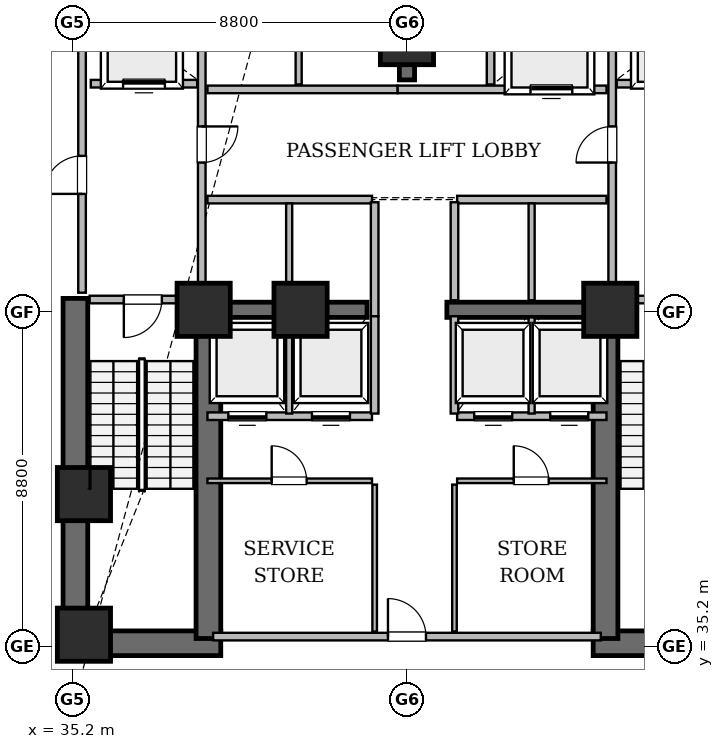
"""IFC4 building model, lengths in metres.
Left out: names, types, materials, properties, quantities, classifications, styles, units other than length and angle.
Written with IfcOpenShell. Run it as: python <this file> out.ifc"""

import sys

from ifc_helpers import new_model, si_unit, direction, frame, frame_2d, origin, origin_2d, place, context, subcontext, project, spatial, rectangle, extrude, element, fill, save


model = new_model("IFC4")
c1 = context("Model", 3, precision=1e-05, world=origin(), true_north=direction((0.0, 1.0)))
c2 = subcontext(c1, "Body", "Model", "MODEL_VIEW")
j1 = project(units=[si_unit("LENGTHUNIT", "METRE"), si_unit("PLANEANGLEUNIT", "RADIAN")], contexts=[c1])
p1 = place(None, origin())
s1 = spatial("IfcSite", under=j1, at=p1, CompositionType="ELEMENT")
p2 = place(p1, origin())
s2 = spatial("IfcBuilding", under=s1, at=p2, CompositionType="ELEMENT")
p3 = place(p2, frame((0.0, 0.0, 19.2)))
s3 = spatial("IfcBuildingStorey", under=s2, at=p3, CompositionType="ELEMENT", Elevation=19.2)
for number, where, z_axis, x_axis in (
    (1, (34.95, 35.275, 0.0), (0.0, 0.0, 1.0), (1.0, 0.0, 0.0)),
    (2, (48.9, 35.275, 0.0), (0.0, 0.0, 1.0), (1.0, 0.0, 0.0)),
):
    element("IfcWall", number, at=place(p3, frame(where, z_axis=z_axis, x_axis=x_axis)), inside=s3, PredefinedType="SHEAR", context=c2, shape_type="SweptSolid", body=[
        extrude(rectangle(XDim=4.15, YDim=0.65, at=frame_2d((2.075, 0.0))), origin(), (0.0, 0.0, 1.0), 4.35),
    ])
p4 = place(p3, frame((35.275, 34.95, 0.0), z_axis=(0.0, 0.0, 1.0), x_axis=(0.0, 1.0, 0.0)))
e3 = element("IfcWall", 3, at=p4, inside=s3, PredefinedType="SHEAR", context=c2, shape_type="SweptSolid", body=[
    extrude(rectangle(XDim=9.4, YDim=0.65, at=frame_2d((4.7, 0.0))), origin(), (0.0, 0.0, 1.0), 4.35),
])
for number, where, z_axis, x_axis in (
    (4, (38.775, 35.4, 0.0), (0.0, 0.0, 1.0), (0.0, 1.0, 0.0)),
    (5, (49.225, 35.4, 0.0), (0.0, 0.0, 1.0), (0.0, 1.0, 0.0)),
):
    element("IfcWall", number, at=place(p3, frame(where, z_axis=z_axis, x_axis=x_axis)), inside=s3, PredefinedType="SHEAR", context=c2, shape_type="SweptSolid", body=[
        extrude(rectangle(XDim=8.95, YDim=0.65, at=frame_2d((4.475, 0.0))), origin(), (0.0, 0.0, 1.0), 4.35),
    ])
p5 = place(p3, frame((44.0, 50.1, 0.0), z_axis=(0.0, 0.0, 1.0), x_axis=(0.0, 1.0, 0.0)))
e6 = element("IfcWall", 6, at=p5, inside=s3, PredefinedType="SHEAR", context=c2, shape_type="SweptSolid", body=[
    extrude(rectangle(XDim=2.1, YDim=0.4, at=frame_2d((1.05, 0.0))), origin(), (0.0, 0.0, 1.0), 4.35),
])
for number, where, z_axis, x_axis in (
    (7, (38.75, 44.05, 0.0), (0.0, 0.0, 1.0), (1.0, 0.0, 0.0)),
    (8, (45.05, 44.05, 0.0), (0.0, 0.0, 1.0), (1.0, 0.0, 0.0)),
):
    element("IfcWall", number, at=place(p3, frame(where, z_axis=z_axis, x_axis=x_axis)), inside=s3, PredefinedType="SHEAR", context=c2, shape_type="SweptSolid", body=[
        extrude(rectangle(XDim=4.2, YDim=0.4, at=frame_2d((2.1, 0.0))), origin(), (0.0, 0.0, 1.0), 4.35),
    ])
for number, where, z_axis, x_axis in (
    (9, (35.5, 35.5, 0.0), (0.0, 0.0, 1.0), (1.0, 0.0, 0.0)),
    (10, (38.65, 44.05, 0.0), (0.0, 0.0, 1.0), (1.0, 0.0, 0.0)),
    (11, (49.35, 44.05, 0.0), (0.0, 0.0, 1.0), (1.0, 0.0, 0.0)),
    (12, (44.0, 51.2, 0.0), (0.0, 0.0, 1.0), (1.0, 0.0, 0.0)),
    (13, (35.5, 39.2, 0.0), (0.0, 0.0, 1.0), (1.0, 0.0, 0.0)),
    (14, (41.2, 44.05, 0.0), (0.0, 0.0, 1.0), (1.0, 0.0, 0.0)),
):
    element("IfcColumn", number, at=place(p3, frame(where, z_axis=z_axis, x_axis=x_axis)), inside=s3, PredefinedType="COLUMN", context=c2, shape_type="SweptSolid", body=[
        extrude(rectangle(XDim=1.4, YDim=1.4, at=origin_2d()), origin(), (0.0, 0.0, 1.0), 4.8),
    ])
p6 = place(p3, frame((38.9, 35.45, 0.0), z_axis=(0.0, 0.0, 1.0), x_axis=(1.0, 0.0, 0.0)))
e15 = element("IfcWall", 15, at=p6, inside=s3, PredefinedType="SOLIDWALL", context=c2, shape_type="SweptSolid", body=[
    extrude(rectangle(XDim=10.2, YDim=0.2, at=frame_2d((5.1, 0.0))), origin(), (0.0, 0.0, 1.0), 4.35),
])
p7 = place(p6, frame((4.6, 0.0, 0.0)))
e16 = element("IfcOpeningElement", 16, at=p7, cuts=e15, PredefinedType="OPENING", context=c2, shape_type="SweptSolid", body=[
    extrude(rectangle(XDim=1.0, YDim=2.15, at=frame_2d((0.5, 1.075))), frame((0.0, 0.11, 0.0), z_axis=(0.0, -1.0, 0.0), x_axis=(1.0, 0.0, 0.0)), (0.0, 0.0, 1.0), 0.22),
])
p8 = place(p3, frame((35.45, 44.5, 0.0), z_axis=(0.0, 0.0, 1.0), x_axis=(0.0, 1.0, 0.0)))
e17 = element("IfcWall", 17, at=p8, inside=s3, PredefinedType="SOLIDWALL", context=c2, shape_type="SweptSolid", body=[
    extrude(rectangle(XDim=7.92, YDim=0.2, at=frame_2d((3.96, 0.0))), origin(), (0.0, 0.0, 1.0), 4.35),
])
p9 = place(p8, frame((2.6, 0.0, 0.0)))
e18 = element("IfcOpeningElement", 18, at=p9, cuts=e17, PredefinedType="OPENING", context=c2, shape_type="SweptSolid", body=[
    extrude(rectangle(XDim=1.0, YDim=2.15, at=frame_2d((0.5, 1.075))), frame((0.0, 0.11, 0.0), z_axis=(0.0, -1.0, 0.0), x_axis=(1.0, 0.0, 0.0)), (0.0, 0.0, 1.0), 0.22),
])
p10 = place(p3, frame((38.6, 44.5, 0.0), z_axis=(0.0, 0.0, 1.0), x_axis=(0.0, 1.0, 0.0)))
e19 = element("IfcWall", 19, at=p10, inside=s3, PredefinedType="SOLIDWALL", context=c2, shape_type="SweptSolid", body=[
    extrude(rectangle(XDim=7.92, YDim=0.2, at=frame_2d((3.96, 0.0))), origin(), (0.0, 0.0, 1.0), 4.35),
])
p11 = place(p10, frame((3.425, 0.0, 0.0)))
e20 = element("IfcOpeningElement", 20, at=p11, cuts=e19, PredefinedType="OPENING", context=c2, shape_type="SweptSolid", body=[
    extrude(rectangle(XDim=0.95, YDim=2.15, at=frame_2d((0.475, 1.075))), frame((0.0, 0.11, 0.0), z_axis=(0.0, -1.0, 0.0), x_axis=(1.0, 0.0, 0.0)), (0.0, 0.0, 1.0), 0.22),
])
p12 = place(p3, frame((49.4, 44.5, 0.0), z_axis=(0.0, 0.0, 1.0), x_axis=(0.0, 1.0, 0.0)))
e21 = element("IfcWall", 21, at=p12, inside=s3, PredefinedType="SOLIDWALL", context=c2, shape_type="SweptSolid", body=[
    extrude(rectangle(XDim=7.92, YDim=0.2, at=frame_2d((3.96, 0.0))), origin(), (0.0, 0.0, 1.0), 3.438),
])
p13 = place(p12, frame((3.425, 0.0, 0.0)))
e22 = element("IfcOpeningElement", 22, at=p13, cuts=e21, PredefinedType="OPENING", context=c2, shape_type="SweptSolid", body=[
    extrude(rectangle(XDim=0.95, YDim=2.15, at=frame_2d((0.475, 1.075))), frame((0.0, 0.11, 0.0), z_axis=(0.0, -1.0, 0.0), x_axis=(1.0, 0.0, 0.0)), (0.0, 0.0, 1.0), 0.22),
])
p14 = place(p3, frame((43.75, 49.85, 0.0), z_axis=(0.0, 0.0, 1.0), x_axis=(1.0, 0.0, 0.0)))
e23 = element("IfcWall", 23, at=p14, inside=s3, PredefinedType="SOLIDWALL", context=c2, shape_type="SweptSolid", body=[
    extrude(rectangle(XDim=5.5, YDim=0.2, at=frame_2d((2.75, 0.0))), origin(), (0.0, 0.0, 1.0), 3.438),
])
p15 = place(p14, frame((3.5, 0.0, 0.0)))
e24 = element("IfcOpeningElement", 24, at=p15, cuts=e23, PredefinedType="OPENING", context=c2, shape_type="SweptSolid", body=[
    extrude(rectangle(XDim=1.1, YDim=2.15, at=frame_2d((0.55, 1.075))), frame((0.0, 0.11, 0.0), z_axis=(0.0, -1.0, 0.0), x_axis=(1.0, 0.0, 0.0)), (0.0, 0.0, 1.0), 0.22),
])
p16 = place(p3, frame((38.75, 41.25, 0.0), z_axis=(0.0, 0.0, 1.0), x_axis=(1.0, 0.0, 0.0)))
e25 = element("IfcWall", 25, at=p16, inside=s3, PredefinedType="SOLIDWALL", context=c2, shape_type="SweptSolid", body=[
    extrude(rectangle(XDim=4.33, YDim=0.2, at=frame_2d((2.165, 0.0))), origin(), (0.0, 0.0, 1.0), 4.35),
])
p17 = place(p16, frame((0.55, 0.0, 0.0)))
e26 = element("IfcOpeningElement", 26, at=p17, cuts=e25, PredefinedType="OPENING", context=c2, shape_type="SweptSolid", body=[
    extrude(rectangle(XDim=1.0, YDim=2.15, at=frame_2d((0.5, 1.075))), frame((0.0, 0.11, 0.0), z_axis=(0.0, -1.0, 0.0), x_axis=(1.0, 0.0, 0.0)), (0.0, 0.0, 1.0), 0.22),
])
p18 = place(p16, frame((2.75, 0.0, 0.0)))
e27 = element("IfcOpeningElement", 27, at=p18, cuts=e25, PredefinedType="OPENING", context=c2, shape_type="SweptSolid", body=[
    extrude(rectangle(XDim=1.0, YDim=2.15, at=frame_2d((0.5, 1.075))), frame((0.0, 0.11, 0.0), z_axis=(0.0, -1.0, 0.0), x_axis=(1.0, 0.0, 0.0)), (0.0, 0.0, 1.0), 0.22),
])
p19 = place(p3, frame((38.75, 39.55, 0.0), z_axis=(0.0, 0.0, 1.0), x_axis=(1.0, 0.0, 0.0)))
e28 = element("IfcWall", 28, at=p19, inside=s3, PredefinedType="PARTITIONING", context=c2, shape_type="SweptSolid", body=[
    extrude(rectangle(XDim=4.33, YDim=0.12, at=frame_2d((2.165, 0.0))), origin(), (0.0, 0.0, 1.0), 4.35),
])
p20 = place(p19, frame((1.69, 0.0, 0.0)))
e29 = element("IfcOpeningElement", 29, at=p20, cuts=e28, PredefinedType="OPENING", context=c2, shape_type="SweptSolid", body=[
    extrude(rectangle(XDim=0.92, YDim=2.1, at=frame_2d((0.46, 1.05))), frame((0.0, 0.07, 0.0), z_axis=(0.0, -1.0, 0.0), x_axis=(1.0, 0.0, 0.0)), (0.0, 0.0, 1.0), 0.14),
])
p21 = place(p3, frame((45.32, 41.25, 0.0), z_axis=(0.0, 0.0, 1.0), x_axis=(1.0, 0.0, 0.0)))
e30 = element("IfcWall", 30, at=p21, inside=s3, PredefinedType="SOLIDWALL", context=c2, shape_type="SweptSolid", body=[
    extrude(rectangle(XDim=3.93, YDim=0.2, at=frame_2d((1.965, 0.0))), origin(), (0.0, 0.0, 1.0), 4.35),
])
p22 = place(p21, frame((0.45, 0.0, 0.0)))
e31 = element("IfcOpeningElement", 31, at=p22, cuts=e30, PredefinedType="OPENING", context=c2, shape_type="SweptSolid", body=[
    extrude(rectangle(XDim=1.0, YDim=2.15, at=frame_2d((0.5, 1.075))), frame((0.0, 0.11, 0.0), z_axis=(0.0, -1.0, 0.0), x_axis=(1.0, 0.0, 0.0)), (0.0, 0.0, 1.0), 0.22),
])
p23 = place(p21, frame((2.45, 0.0, 0.0)))
e32 = element("IfcOpeningElement", 32, at=p23, cuts=e30, PredefinedType="OPENING", context=c2, shape_type="SweptSolid", body=[
    extrude(rectangle(XDim=1.0, YDim=2.15, at=frame_2d((0.5, 1.075))), frame((0.0, 0.11, 0.0), z_axis=(0.0, -1.0, 0.0), x_axis=(1.0, 0.0, 0.0)), (0.0, 0.0, 1.0), 0.22),
])
p24 = place(p3, frame((45.32, 39.55, 0.0), z_axis=(0.0, 0.0, 1.0), x_axis=(1.0, 0.0, 0.0)))
e33 = element("IfcWall", 33, at=p24, inside=s3, PredefinedType="PARTITIONING", context=c2, shape_type="SweptSolid", body=[
    extrude(rectangle(XDim=3.93, YDim=0.12, at=frame_2d((1.965, 0.0))), origin(), (0.0, 0.0, 1.0), 4.35),
])
p25 = place(p24, frame((1.49, 0.0, 0.0)))
e34 = element("IfcOpeningElement", 34, at=p25, cuts=e33, PredefinedType="OPENING", context=c2, shape_type="SweptSolid", body=[
    extrude(rectangle(XDim=0.92, YDim=2.1, at=frame_2d((0.46, 1.05))), frame((0.0, 0.07, 0.0), z_axis=(0.0, -1.0, 0.0), x_axis=(1.0, 0.0, 0.0)), (0.0, 0.0, 1.0), 0.14),
])
p26 = place(p3, frame((35.65, 44.32, 0.0), z_axis=(0.0, 0.0, 1.0), x_axis=(1.0, 0.0, 0.0)))
e35 = element("IfcWall", 35, at=p26, inside=s3, PredefinedType="SOLIDWALL", context=c2, shape_type="SweptSolid", body=[
    extrude(rectangle(XDim=2.8, YDim=0.2, at=frame_2d((1.4, 0.0))), origin(), (0.0, 0.0, 1.0), 4.35),
])
p27 = place(p26, frame((0.9, 0.0, 0.0)))
e36 = element("IfcOpeningElement", 36, at=p27, cuts=e35, PredefinedType="OPENING", context=c2, shape_type="SweptSolid", body=[
    extrude(rectangle(XDim=1.0, YDim=2.15, at=frame_2d((0.5, 1.075))), frame((0.0, 0.11, 0.0), z_axis=(0.0, -1.0, 0.0), x_axis=(1.0, 0.0, 0.0)), (0.0, 0.0, 1.0), 0.22),
])
p28 = place(p3, frame((49.55, 44.32, 0.0), z_axis=(0.0, 0.0, 1.0), x_axis=(1.0, 0.0, 0.0)))
e37 = element("IfcWall", 37, at=p28, inside=s3, PredefinedType="SOLIDWALL", context=c2, shape_type="SweptSolid", body=[
    extrude(rectangle(XDim=2.8, YDim=0.2, at=frame_2d((1.4, 0.0))), origin(), (0.0, 0.0, 1.0), 3.438),
])
p29 = place(p28, frame((0.9, 0.0, 0.0)))
e38 = element("IfcOpeningElement", 38, at=p29, cuts=e37, PredefinedType="OPENING", context=c2, shape_type="SweptSolid", body=[
    extrude(rectangle(XDim=1.0, YDim=2.15, at=frame_2d((0.5, 1.075))), frame((0.0, 0.11, 0.0), z_axis=(0.0, -1.0, 0.0), x_axis=(1.0, 0.0, 0.0)), (0.0, 0.0, 1.0), 0.22),
])
p30 = place(p3, frame((35.68, 50.0, 0.0), z_axis=(0.0, 0.0, 1.0), x_axis=(1.0, 0.0, 0.0)))
e39 = element("IfcWall", 39, at=p30, inside=s3, PredefinedType="SOLIDWALL", context=c2, shape_type="SweptSolid", body=[
    extrude(rectangle(XDim=2.8, YDim=0.2, at=frame_2d((1.4, 0.0))), origin(), (0.0, 0.0, 1.0), 4.35),
])
p31 = place(p30, frame((0.85, 0.0, 0.0)))
e40 = element("IfcOpeningElement", 40, at=p31, cuts=e39, PredefinedType="OPENING", context=c2, shape_type="SweptSolid", body=[
    extrude(rectangle(XDim=1.1, YDim=2.15, at=frame_2d((0.55, 1.075))), frame((0.0, 0.11, 0.0), z_axis=(0.0, -1.0, 0.0), x_axis=(1.0, 0.0, 0.0)), (0.0, 0.0, 1.0), 0.22),
])
p32 = place(p3, frame((49.52, 50.0, 0.0), z_axis=(0.0, 0.0, 1.0), x_axis=(1.0, 0.0, 0.0)))
e41 = element("IfcWall", 41, at=p32, inside=s3, PredefinedType="SOLIDWALL", context=c2, shape_type="SweptSolid", body=[
    extrude(rectangle(XDim=2.8, YDim=0.2, at=frame_2d((1.4, 0.0))), origin(), (0.0, 0.0, 1.0), 4.35),
])
p33 = place(p32, frame((0.85, 0.0, 0.0)))
e42 = element("IfcOpeningElement", 42, at=p33, cuts=e41, PredefinedType="OPENING", context=c2, shape_type="SweptSolid", body=[
    extrude(rectangle(XDim=1.1, YDim=2.15, at=frame_2d((0.55, 1.075))), frame((0.0, 0.11, 0.0), z_axis=(0.0, -1.0, 0.0), x_axis=(1.0, 0.0, 0.0)), (0.0, 0.0, 1.0), 0.22),
])
p34 = place(p3, frame((38.75, 49.85, 0.0), z_axis=(0.0, 0.0, 1.0), x_axis=(1.0, 0.0, 0.0)))
e43 = element("IfcWall", 43, at=p34, inside=s3, PredefinedType="SOLIDWALL", context=c2, shape_type="SweptSolid", body=[
    extrude(rectangle(XDim=5.0, YDim=0.2, at=frame_2d((2.5, 0.0))), origin(), (0.0, 0.0, 1.0), 4.35),
])
p35 = place(p3, frame((38.75, 46.95, 0.0), z_axis=(0.0, 0.0, 1.0), x_axis=(1.0, 0.0, 0.0)))
e44 = element("IfcWall", 44, at=p35, inside=s3, PredefinedType="SOLIDWALL", context=c2, shape_type="SweptSolid", body=[
    extrude(rectangle(XDim=4.33, YDim=0.2, at=frame_2d((2.165, 0.0))), origin(), (0.0, 0.0, 1.0), 4.35),
])
p36 = place(p3, frame((45.32, 46.95, 0.0), z_axis=(0.0, 0.0, 1.0), x_axis=(1.0, 0.0, 0.0)))
e45 = element("IfcWall", 45, at=p36, inside=s3, PredefinedType="SOLIDWALL", context=c2, shape_type="SweptSolid", body=[
    extrude(rectangle(XDim=3.93, YDim=0.2, at=frame_2d((1.965, 0.0))), origin(), (0.0, 0.0, 1.0), 3.438),
])
for number, where, z_axis, x_axis in (
    (46, (43.15, 35.58, 0.0), (0.0, 0.0, 1.0), (0.0, 1.0, 0.0)),
    (47, (45.25, 35.58, 0.0), (0.0, 0.0, 1.0), (0.0, 1.0, 0.0)),
):
    element("IfcWall", number, at=place(p3, frame(where, z_axis=z_axis, x_axis=x_axis)), inside=s3, PredefinedType="PARTITIONING", context=c2, shape_type="SweptSolid", body=[
        extrude(rectangle(XDim=3.87, YDim=0.12, at=frame_2d((1.935, 0.0))), origin(), (0.0, 0.0, 1.0), 4.35),
    ])
p37 = place(p3, frame((43.15, 43.88, 0.0), z_axis=(0.0, 0.0, 1.0), x_axis=(0.0, 1.0, 0.0)))
e48 = element("IfcWall", 48, at=p37, inside=s3, PredefinedType="SOLIDWALL", context=c2, shape_type="SweptSolid", body=[
    extrude(rectangle(XDim=3.0, YDim=0.2, at=frame_2d((1.5, 0.0))), origin(), (0.0, 0.0, 1.0), 4.35),
])
p38 = place(p3, frame((45.25, 44.3, 0.0), z_axis=(0.0, 0.0, 1.0), x_axis=(0.0, 1.0, 0.0)))
e49 = element("IfcWall", 49, at=p38, inside=s3, PredefinedType="SOLIDWALL", context=c2, shape_type="SweptSolid", body=[
    extrude(rectangle(XDim=2.58, YDim=0.2, at=frame_2d((1.29, 0.0))), origin(), (0.0, 0.0, 1.0), 4.35),
])
for number, where, z_axis, x_axis in (
    (50, (43.15, 41.32, 0.0), (0.0, 0.0, 1.0), (0.0, 1.0, 0.0)),
    (51, (45.25, 41.32, 0.0), (0.0, 0.0, 1.0), (0.0, 1.0, 0.0)),
):
    element("IfcWall", number, at=place(p3, frame(where, z_axis=z_axis, x_axis=x_axis)), inside=s3, PredefinedType="SOLIDWALL", context=c2, shape_type="SweptSolid", body=[
        extrude(rectangle(XDim=2.56, YDim=0.2, at=frame_2d((1.28, 0.0))), origin(), (0.0, 0.0, 1.0), 4.35),
    ])
p39 = place(p3, frame((40.9, 44.3, 0.0), z_axis=(0.0, 0.0, 1.0), x_axis=(0.0, 1.0, 0.0)))
e52 = element("IfcWall", 52, at=p39, inside=s3, PredefinedType="SOLIDWALL", context=c2, shape_type="SweptSolid", body=[
    extrude(rectangle(XDim=2.55, YDim=0.16, at=frame_2d((1.275, 0.0))), origin(), (0.0, 0.0, 1.0), 4.35),
])
p40 = place(p3, frame((47.28, 44.3, 0.0), z_axis=(0.0, 0.0, 1.0), x_axis=(0.0, 1.0, 0.0)))
e53 = element("IfcWall", 53, at=p40, inside=s3, PredefinedType="SOLIDWALL", context=c2, shape_type="SweptSolid", body=[
    extrude(rectangle(XDim=2.55, YDim=0.16, at=frame_2d((1.275, 0.0))), origin(), (0.0, 0.0, 1.0), 3.438),
])
for number, where, z_axis, x_axis in (
    (54, (40.9, 41.32, 0.0), (0.0, 0.0, 1.0), (0.0, 1.0, 0.0)),
    (55, (47.28, 41.32, 0.0), (0.0, 0.0, 1.0), (0.0, 1.0, 0.0)),
):
    element("IfcWall", number, at=place(p3, frame(where, z_axis=z_axis, x_axis=x_axis)), inside=s3, PredefinedType="SOLIDWALL", context=c2, shape_type="SweptSolid", body=[
        extrude(rectangle(XDim=2.53, YDim=0.16, at=frame_2d((1.265, 0.0))), origin(), (0.0, 0.0, 1.0), 4.35),
    ])
p41 = place(p3, frame((41.15, 49.98, 0.0), z_axis=(0.0, 0.0, 1.0), x_axis=(0.0, 1.0, 0.0)))
e56 = element("IfcWall", 56, at=p41, inside=s3, PredefinedType="SOLIDWALL", context=c2, shape_type="SweptSolid", body=[
    extrude(rectangle(XDim=2.37, YDim=0.16, at=frame_2d((1.185, 0.0))), origin(), (0.0, 0.0, 1.0), 4.35),
])
p42 = place(p3, frame((46.2, 49.98, 0.0), z_axis=(0.0, 0.0, 1.0), x_axis=(0.0, 1.0, 0.0)))
e57 = element("IfcWall", 57, at=p42, inside=s3, PredefinedType="SOLIDWALL", context=c2, shape_type="SweptSolid", body=[
    extrude(rectangle(XDim=2.37, YDim=0.2, at=frame_2d((1.185, 0.0))), origin(), (0.0, 0.0, 1.0), 4.35),
])
p43 = place(p27, frame((1.0, 0.0, 0.0), z_axis=(0.0, 0.0, 1.0), x_axis=(-1.0, 0.0, 0.0)))
e58 = element("IfcDoor", 58, at=p43, inside=s3, OperationType="SINGLE_SWING_LEFT", PredefinedType="DOOR", context=c2, shape_type="SweptSolid", body=[
    extrude(rectangle(XDim=1.0, YDim=2.15, at=frame_2d((0.5, 1.075))), frame((0.0, 0.025, 0.0), z_axis=(0.0, -1.0, 0.0), x_axis=(1.0, 0.0, 0.0)), (0.0, 0.0, 1.0), 0.05),
])
fill(e36, e58)
p44 = place(p9, origin())
e59 = element("IfcDoor", 59, at=p44, inside=s3, OperationType="SINGLE_SWING_LEFT", PredefinedType="DOOR", context=c2, shape_type="SweptSolid", body=[
    extrude(rectangle(XDim=1.0, YDim=2.15, at=frame_2d((0.5, 1.075))), frame((0.0, 0.025, 0.0), z_axis=(0.0, -1.0, 0.0), x_axis=(1.0, 0.0, 0.0)), (0.0, 0.0, 1.0), 0.05),
])
fill(e18, e59)
p45 = place(p11, frame((0.95, 0.0, 0.0), z_axis=(0.0, 0.0, 1.0), x_axis=(-1.0, 0.0, 0.0)))
e60 = element("IfcDoor", 60, at=p45, inside=s3, OperationType="SINGLE_SWING_RIGHT", PredefinedType="DOOR", context=c2, shape_type="SweptSolid", body=[
    extrude(rectangle(XDim=0.95, YDim=2.15, at=frame_2d((0.475, 1.075))), frame((0.0, 0.025, 0.0), z_axis=(0.0, -1.0, 0.0), x_axis=(1.0, 0.0, 0.0)), (0.0, 0.0, 1.0), 0.05),
])
fill(e20, e60)
p46 = place(p13, origin())
e61 = element("IfcDoor", 61, at=p46, inside=s3, OperationType="SINGLE_SWING_LEFT", PredefinedType="DOOR", context=c2, shape_type="SweptSolid", body=[
    extrude(rectangle(XDim=0.95, YDim=2.15, at=frame_2d((0.475, 1.075))), frame((0.0, 0.025, 0.0), z_axis=(0.0, -1.0, 0.0), x_axis=(1.0, 0.0, 0.0)), (0.0, 0.0, 1.0), 0.05),
])
fill(e22, e61)
p47 = place(p31, origin())
e62 = element("IfcDoor", 62, at=p47, inside=s3, OperationType="SLIDING_TO_LEFT", PredefinedType="DOOR", context=c2, shape_type="SweptSolid", body=[
    extrude(rectangle(XDim=1.1, YDim=2.15, at=frame_2d((0.55, 1.075))), frame((0.0, 0.025, 0.0), z_axis=(0.0, -1.0, 0.0), x_axis=(1.0, 0.0, 0.0)), (0.0, 0.0, 1.0), 0.05),
])
fill(e40, e62)
p48 = place(p7, origin())
e63 = element("IfcDoor", 63, at=p48, inside=s3, OperationType="SINGLE_SWING_LEFT", PredefinedType="DOOR", context=c2, shape_type="SweptSolid", body=[
    extrude(rectangle(XDim=1.0, YDim=2.15, at=frame_2d((0.5, 1.075))), frame((0.0, 0.025, 0.0), z_axis=(0.0, -1.0, 0.0), x_axis=(1.0, 0.0, 0.0)), (0.0, 0.0, 1.0), 0.05),
])
fill(e16, e63)
p49 = place(p15, origin())
e64 = element("IfcDoor", 64, at=p49, inside=s3, OperationType="SLIDING_TO_LEFT", PredefinedType="DOOR", context=c2, shape_type="SweptSolid", body=[
    extrude(rectangle(XDim=1.1, YDim=2.15, at=frame_2d((0.55, 1.075))), frame((0.0, 0.025, 0.0), z_axis=(0.0, -1.0, 0.0), x_axis=(1.0, 0.0, 0.0)), (0.0, 0.0, 1.0), 0.05),
])
fill(e24, e64)
p50 = place(p17, frame((1.0, 0.0, 0.0), z_axis=(0.0, 0.0, 1.0), x_axis=(-1.0, 0.0, 0.0)))
e65 = element("IfcDoor", 65, at=p50, inside=s3, OperationType="SLIDING_TO_LEFT", PredefinedType="DOOR", context=c2, shape_type="SweptSolid", body=[
    extrude(rectangle(XDim=1.0, YDim=2.15, at=frame_2d((0.5, 1.075))), frame((0.0, 0.025, 0.0), z_axis=(0.0, -1.0, 0.0), x_axis=(1.0, 0.0, 0.0)), (0.0, 0.0, 1.0), 0.05),
])
fill(e26, e65)
p51 = place(p18, frame((1.0, 0.0, 0.0), z_axis=(0.0, 0.0, 1.0), x_axis=(-1.0, 0.0, 0.0)))
e66 = element("IfcDoor", 66, at=p51, inside=s3, OperationType="SLIDING_TO_LEFT", PredefinedType="DOOR", context=c2, shape_type="SweptSolid", body=[
    extrude(rectangle(XDim=1.0, YDim=2.15, at=frame_2d((0.5, 1.075))), frame((0.0, 0.025, 0.0), z_axis=(0.0, -1.0, 0.0), x_axis=(1.0, 0.0, 0.0)), (0.0, 0.0, 1.0), 0.05),
])
fill(e27, e66)
p52 = place(p22, frame((1.0, 0.0, 0.0), z_axis=(0.0, 0.0, 1.0), x_axis=(-1.0, 0.0, 0.0)))
e67 = element("IfcDoor", 67, at=p52, inside=s3, OperationType="SLIDING_TO_LEFT", PredefinedType="DOOR", context=c2, shape_type="SweptSolid", body=[
    extrude(rectangle(XDim=1.0, YDim=2.15, at=frame_2d((0.5, 1.075))), frame((0.0, 0.025, 0.0), z_axis=(0.0, -1.0, 0.0), x_axis=(1.0, 0.0, 0.0)), (0.0, 0.0, 1.0), 0.05),
])
fill(e31, e67)
p53 = place(p23, frame((1.0, 0.0, 0.0), z_axis=(0.0, 0.0, 1.0), x_axis=(-1.0, 0.0, 0.0)))
e68 = element("IfcDoor", 68, at=p53, inside=s3, OperationType="SLIDING_TO_LEFT", PredefinedType="DOOR", context=c2, shape_type="SweptSolid", body=[
    extrude(rectangle(XDim=1.0, YDim=2.15, at=frame_2d((0.5, 1.075))), frame((0.0, 0.025, 0.0), z_axis=(0.0, -1.0, 0.0), x_axis=(1.0, 0.0, 0.0)), (0.0, 0.0, 1.0), 0.05),
])
fill(e32, e68)
p54 = place(p20, origin())
e69 = element("IfcDoor", 69, at=p54, inside=s3, OperationType="SINGLE_SWING_LEFT", PredefinedType="DOOR", context=c2, shape_type="SweptSolid", body=[
    extrude(rectangle(XDim=0.92, YDim=2.1, at=frame_2d((0.46, 1.05))), frame((0.0, 0.025, 0.0), z_axis=(0.0, -1.0, 0.0), x_axis=(1.0, 0.0, 0.0)), (0.0, 0.0, 1.0), 0.05),
])
fill(e29, e69)
p55 = place(p25, origin())
e70 = element("IfcDoor", 70, at=p55, inside=s3, OperationType="SINGLE_SWING_LEFT", PredefinedType="DOOR", context=c2, shape_type="SweptSolid", body=[
    extrude(rectangle(XDim=0.92, YDim=2.1, at=frame_2d((0.46, 1.05))), frame((0.0, 0.025, 0.0), z_axis=(0.0, -1.0, 0.0), x_axis=(1.0, 0.0, 0.0)), (0.0, 0.0, 1.0), 0.05),
])
fill(e34, e70)
save(model, sys.argv[1])
